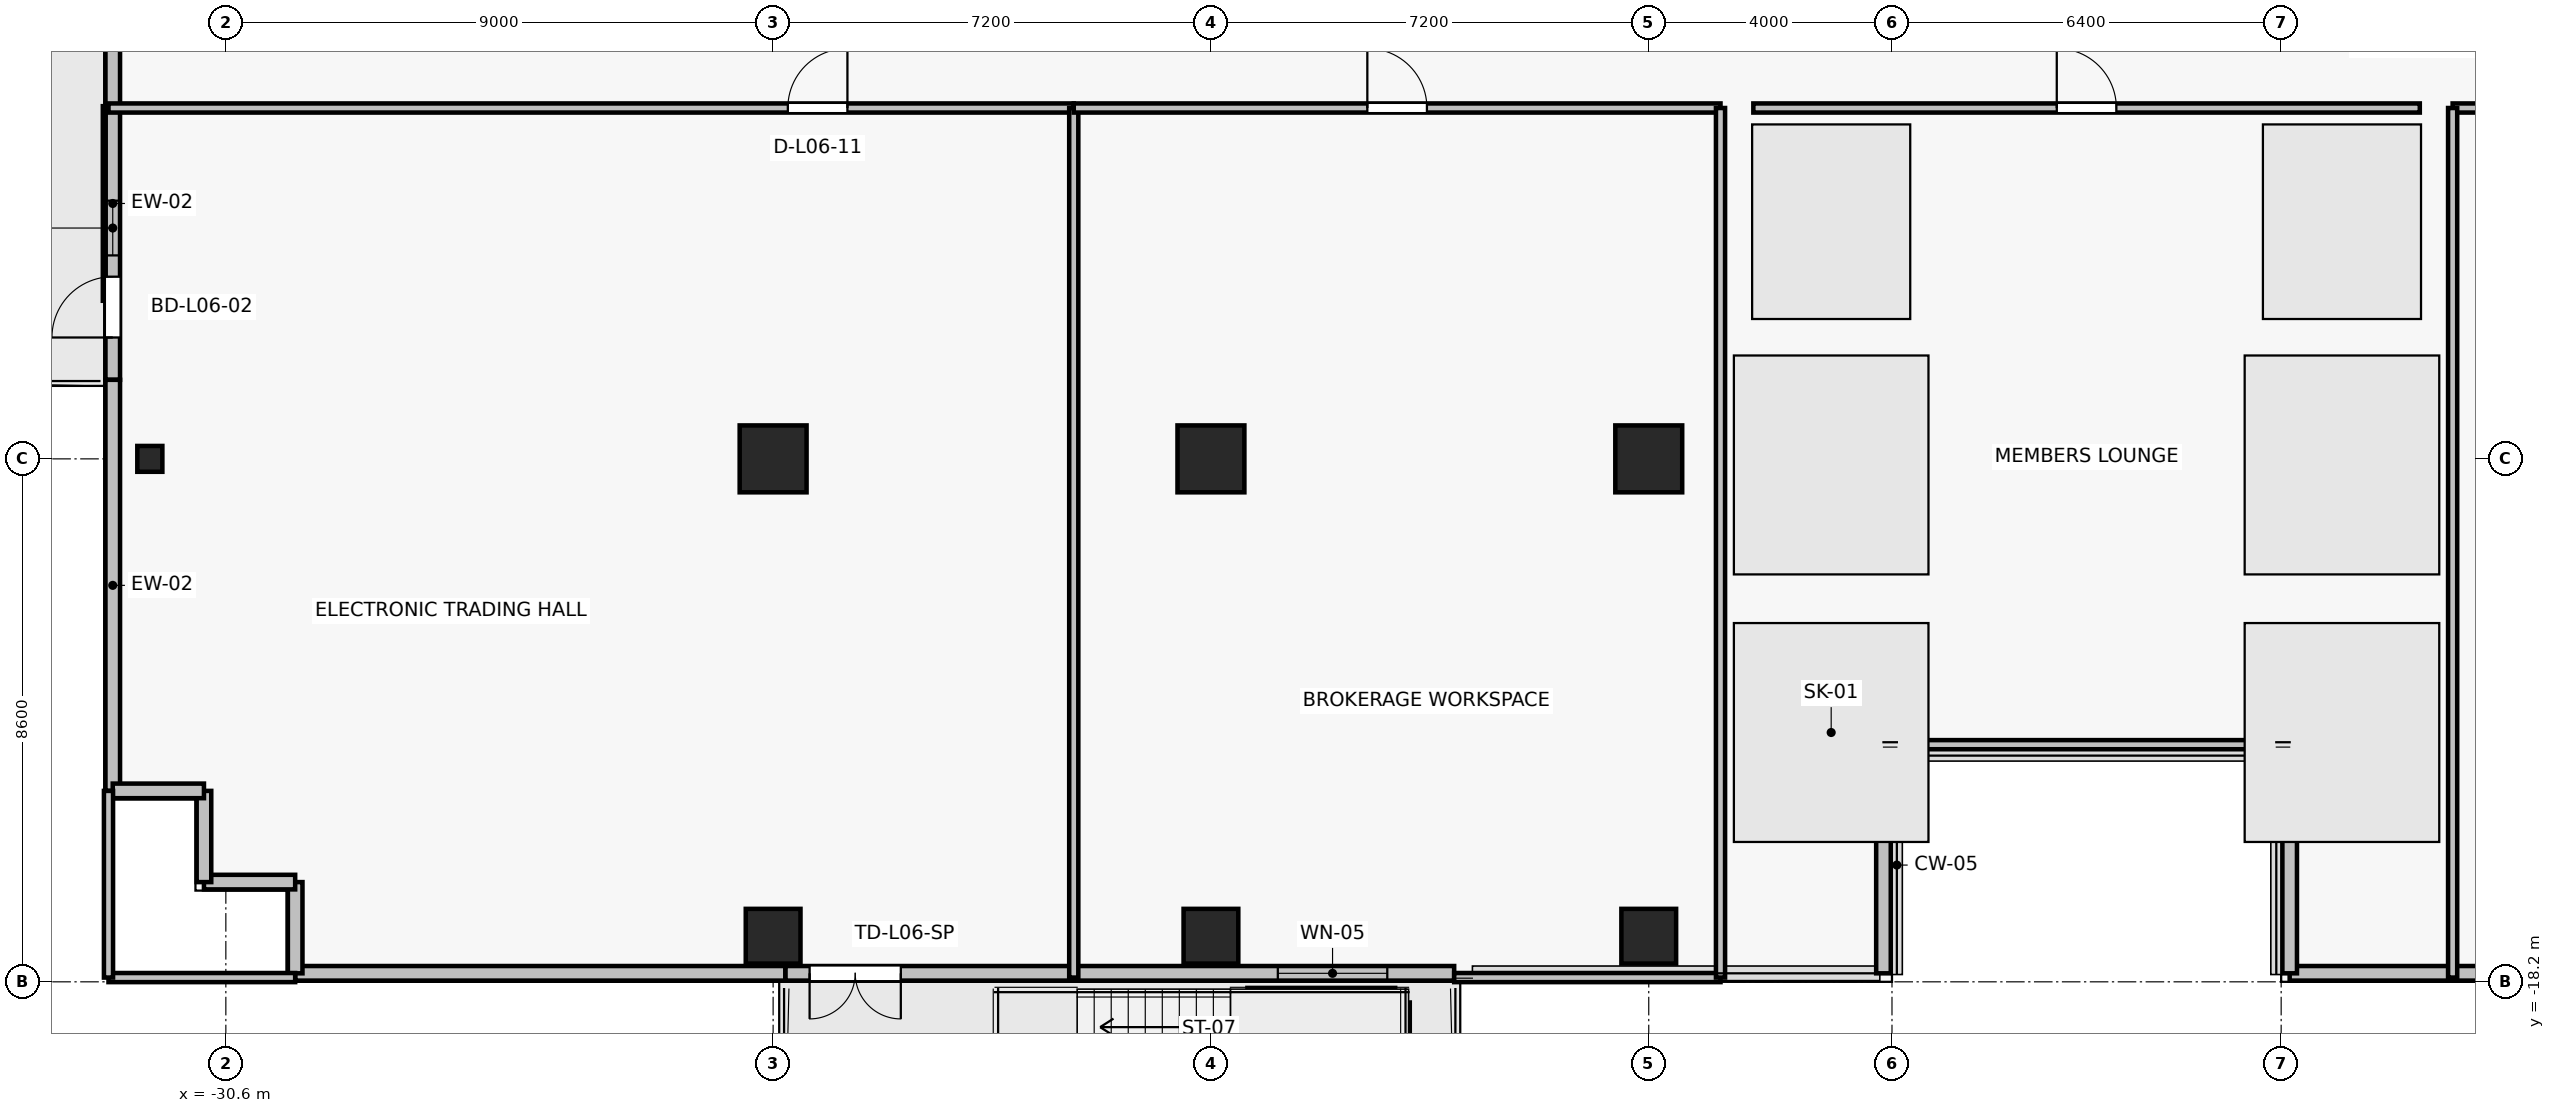
"""IFC4 building model, lengths in metres.
Left out: names, types, materials, properties, quantities, classifications, styles, units other than length and angle.
Written with IfcOpenShell. Run it as: python <this file> out.ifc"""

import sys

from ifc_helpers import new_model, si_unit, direction, frame, frame_2d, origin, origin_2d, place, context, subcontext, project, spatial, rectangle, i_section, extrude, source, transform, mapped, element, fill, save


model = new_model("IFC4")
c1 = context("Model", 3, precision=1e-05, world=origin(), true_north=direction((0.0, 1.0)))
c2 = subcontext(c1, "Body", "Model", "MODEL_VIEW")
j1 = project(units=[si_unit("LENGTHUNIT", "METRE"), si_unit("PLANEANGLEUNIT", "RADIAN")], contexts=[c1])
p1 = place(None, origin())
s1 = spatial("IfcSite", under=j1, at=p1, CompositionType="ELEMENT")
p2 = place(p1, origin())
s2 = spatial("IfcBuilding", under=s1, at=p2, CompositionType="ELEMENT")
p3 = place(p2, frame((0.0, 0.0, 27.4)))
s3 = spatial("IfcBuildingStorey", under=s2, at=p3, CompositionType="ELEMENT", Elevation=27.4)
for number, where, z_axis, x_axis in (
    (1, (-14.4, -9.6, 0.0), (0.0, 0.0, 1.0), (1.0, 0.0, 0.0)),
    (2, (-7.2, -9.6, 0.0), (0.0, 0.0, 1.0), (1.0, 0.0, 0.0)),
    (3, (-21.6, -9.6, 0.0), (0.0, 0.0, 1.0), (1.0, 0.0, 0.0)),
):
    element("IfcColumn", number, at=place(p3, frame(where, z_axis=z_axis, x_axis=x_axis)), inside=s3, PredefinedType="COLUMN", context=c2, shape_type="SweptSolid", body=[
        extrude(rectangle(XDim=1.1, YDim=1.1, at=origin_2d()), origin(), (0.0, 0.0, 1.0), 3.3),
    ])
for number, where, z_axis, x_axis in (
    (4, (-14.4, -17.45, 0.0), (0.0, 0.0, 1.0), (1.0, 0.0, 0.0)),
    (5, (-7.2, -17.45, 0.0), (0.0, 0.0, 1.0), (1.0, 0.0, 0.0)),
    (6, (-21.6, -17.45, 0.0), (0.0, 0.0, 1.0), (1.0, 0.0, 0.0)),
):
    element("IfcColumn", number, at=place(p3, frame(where, z_axis=z_axis, x_axis=x_axis)), inside=s3, PredefinedType="COLUMN", context=c2, shape_type="SweptSolid", body=[
        extrude(rectangle(XDim=0.9, YDim=0.9, at=origin_2d()), origin(), (0.0, 0.0, 1.0), 3.3),
    ])
p4 = place(p3, frame((-31.85, -9.6, 0.0), z_axis=(0.0, 0.0, 1.0), x_axis=(1.0, 0.0, 0.0)))
e7 = element("IfcColumn", 7, at=p4, inside=s3, PredefinedType="COLUMN", context=c2, shape_type="SweptSolid", body=[
    extrude(i_section(OverallWidth=0.412, OverallDepth=0.425, WebThickness=0.026, FlangeThickness=0.039, FilletRadius=0.015, at=origin_2d()), origin(), (0.0, 0.0, 1.0), 3.3),
])
p5 = place(p3, frame((-32.46, -8.3, 0.0), z_axis=(0.0, 0.0, 1.0), x_axis=(0.0, 1.0, 0.0)))
e8 = element("IfcWall", 8, at=p5, inside=s3, PredefinedType="SOLIDWALL", context=c2, shape_type="SweptSolid", body=[
    extrude(rectangle(XDim=5.8, YDim=0.24, at=frame_2d((2.9, 0.0))), origin(), (0.0, 0.0, 1.0), 3.075),
])
p6 = place(p5, frame((0.696, 0.0, 0.0)))
e9 = element("IfcOpeningElement", 9, at=p6, cuts=e8, PredefinedType="OPENING", context=c2, shape_type="SweptSolid", body=[
    extrude(rectangle(XDim=1.0, YDim=2.2, at=frame_2d((0.5, 1.1))), frame((0.0, 0.13, 0.0), z_axis=(0.0, -1.0, 0.0), x_axis=(1.0, 0.0, 0.0)), (0.0, 0.0, 1.0), 0.26),
])
p7 = place(p5, frame((2.046, 0.0, 0.85)))
e10 = element("IfcOpeningElement", 10, at=p7, cuts=e8, PredefinedType="OPENING", context=c2, shape_type="SweptSolid", body=[
    extrude(rectangle(XDim=0.9, YDim=1.35, at=frame_2d((0.45, 0.675))), frame((0.0, 0.13, 0.0), z_axis=(0.0, -1.0, 0.0), x_axis=(1.0, 0.0, 0.0)), (0.0, 0.0, 1.0), 0.26),
])
p8 = place(p3, frame((-10.4, -18.06, 0.0), z_axis=(0.0, 0.0, 1.0), x_axis=(-1.0, 0.0, 0.0)))
e11 = element("IfcWall", 11, at=p8, inside=s3, PredefinedType="SOLIDWALL", context=c2, shape_type="SweptSolid", body=[
    extrude(rectangle(XDim=11.0, YDim=0.24, at=frame_2d((5.5, 0.0))), origin(), (0.0, 0.0, 1.0), 2.59),
])
p9 = place(p8, frame((9.1, 0.0, 0.0)))
e12 = element("IfcOpeningElement", 12, at=p9, cuts=e11, PredefinedType="OPENING", context=c2, shape_type="SweptSolid", body=[
    extrude(rectangle(XDim=1.5, YDim=2.2, at=frame_2d((0.75, 1.1))), frame((0.0, 0.13, 0.0), z_axis=(0.0, -1.0, 0.0), x_axis=(1.0, 0.0, 0.0)), (0.0, 0.0, 1.0), 0.26),
])
p10 = place(p8, frame((1.1, 0.0, 0.85)))
e13 = element("IfcOpeningElement", 13, at=p10, cuts=e11, PredefinedType="OPENING", context=c2, shape_type="SweptSolid", body=[
    extrude(rectangle(XDim=1.8, YDim=1.6, at=frame_2d((0.9, 0.8))), frame((0.0, 0.13, 0.0), z_axis=(0.0, -1.0, 0.0), x_axis=(1.0, 0.0, 0.0)), (0.0, 0.0, 1.0), 0.26),
])
p11 = place(p3, frame((-32.46, -8.3, 0.0), z_axis=(0.0, 0.0, 1.0), x_axis=(0.0, -1.0, 0.0)))
e14 = element("IfcWall", 14, at=p11, inside=s3, PredefinedType="SOLIDWALL", context=c2, shape_type="SweptSolid", body=[
    extrude(rectangle(XDim=6.76, YDim=0.24, at=frame_2d((3.38, 0.0))), origin(), (0.0, 0.0, 1.0), 3.075),
])
p12 = place(p3, frame((3.34, -18.06, 0.0), z_axis=(0.0, 0.0, 1.0), x_axis=(1.0, 0.0, 0.0)))
e15 = element("IfcWall", 15, at=p12, inside=s3, PredefinedType="SOLIDWALL", context=c2, shape_type="SweptSolid", body=[
    extrude(rectangle(XDim=10.46, YDim=0.24, at=frame_2d((5.23, 0.0))), origin(), (0.0, 0.0, 1.0), 2.665),
])
for number, where, z_axis, x_axis in (
    (16, (3.34, -14.26, 0.0), (0.0, 0.0, 1.0), (0.0, -1.0, 0.0)),
    (17, (-3.34, -18.06, 0.0), (0.0, 0.0, 1.0), (0.0, 1.0, 0.0)),
):
    element("IfcWall", number, at=place(p3, frame(where, z_axis=z_axis, x_axis=x_axis)), inside=s3, PredefinedType="SOLIDWALL", context=c2, shape_type="SweptSolid", body=[
        extrude(rectangle(XDim=3.8, YDim=0.24, at=frame_2d((1.9, 0.0))), origin(), (0.0, 0.0, 1.0), 2.465),
    ])
p13 = place(p3, frame((-29.46, -18.06, 0.0), z_axis=(0.0, 0.0, 1.0), x_axis=(1.0, 0.0, 0.0)))
e18 = element("IfcWall", 18, at=p13, inside=s3, PredefinedType="SOLIDWALL", context=c2, shape_type="SweptSolid", body=[
    extrude(rectangle(XDim=8.06, YDim=0.24, at=frame_2d((4.03, 0.0))), origin(), (0.0, 0.0, 1.0), 3.075),
])
for number, where, z_axis, x_axis in (
    (19, (-29.46, -16.56, 0.0), (0.0, 0.0, 1.0), (0.0, -1.0, 0.0)),
    (20, (-30.96, -16.56, 0.0), (0.0, 0.0, 1.0), (1.0, 0.0, 0.0)),
    (21, (-30.96, -15.06, 0.0), (0.0, 0.0, 1.0), (0.0, -1.0, 0.0)),
    (22, (-32.46, -15.06, 0.0), (0.0, 0.0, 1.0), (1.0, 0.0, 0.0)),
):
    element("IfcWall", number, at=place(p3, frame(where, z_axis=z_axis, x_axis=x_axis)), inside=s3, PredefinedType="SOLIDWALL", context=c2, shape_type="SweptSolid", body=[
        extrude(rectangle(XDim=1.5, YDim=0.24, at=frame_2d((0.75, 0.0))), origin(), (0.0, 0.0, 1.0), 3.075),
    ])
p14 = place(p3, frame((-11.23, -20.72, -0.25), z_axis=(0.0, 0.0, 1.0), x_axis=(0.0, 1.0, 0.0)))
e23 = element("IfcWall", 23, at=p14, inside=s3, PredefinedType="SOLIDWALL", context=c2, shape_type="SweptSolid", body=[
    extrude(rectangle(XDim=2.18, YDim=0.2, at=frame_2d((1.09, 0.0))), origin(), (0.0, 0.0, 1.0), 1.7),
])
p15 = place(p3, frame((-13.8, -18.4, -0.25), z_axis=(0.0, 0.0, 1.0), x_axis=(1.0, 0.0, 0.0)))
e24 = element("IfcWall", 24, at=p15, inside=s3, PredefinedType="SOLIDWALL", context=c2, shape_type="SweptSolid", body=[
    extrude(rectangle(XDim=2.43, YDim=0.2, at=frame_2d((1.215, 0.0))), origin(), (0.0, 0.0, 1.0), 1.7),
])
p16 = place(p3, frame((-29.46, -18.13, 0.0), z_axis=(0.0, 0.0, 1.0), x_axis=(-1.0, 0.0, 0.0)))
e25 = element("IfcWall", 25, at=p16, inside=s3, PredefinedType="PARTITIONING", context=c2, shape_type="SweptSolid", body=[
    extrude(rectangle(XDim=3.07, YDim=0.15, at=frame_2d((1.535, 0.0))), origin(), (0.0, 0.0, 1.0), 2.59),
])
p17 = place(p3, frame((-32.53, -3.83, 0.0), z_axis=(0.0, 0.0, 1.0), x_axis=(1.0, 0.0, 0.0)))
e26 = element("IfcWall", 26, at=p17, inside=s3, PredefinedType="PARTITIONING", context=c2, shape_type="SweptSolid", body=[
    extrude(rectangle(XDim=15.874, YDim=0.15, at=frame_2d((7.937, 0.0))), origin(), (0.0, 0.0, 1.0), 2.465),
])
p18 = place(p17, frame((11.172, 0.0, 0.0)))
e27 = element("IfcOpeningElement", 27, at=p18, cuts=e26, PredefinedType="OPENING", context=c2, shape_type="SweptSolid", body=[
    extrude(rectangle(XDim=0.98, YDim=2.15, at=frame_2d((0.49, 1.075))), frame((0.0, 0.085, 0.0), z_axis=(0.0, -1.0, 0.0), x_axis=(1.0, 0.0, 0.0)), (0.0, 0.0, 1.0), 0.17),
])
p19 = place(p3, frame((-32.53, -18.13, 0.0), z_axis=(0.0, 0.0, 1.0), x_axis=(0.0, 1.0, 0.0)))
e28 = element("IfcWall", 28, at=p19, inside=s3, PredefinedType="PARTITIONING", context=c2, shape_type="SweptSolid", body=[
    extrude(rectangle(XDim=3.07, YDim=0.15, at=frame_2d((1.535, 0.0))), origin(), (0.0, 0.0, 1.0), 3.075),
])
p20 = place(p3, frame((-16.656, -3.83, 0.0), z_axis=(0.0, 0.0, 1.0), x_axis=(0.0, -1.0, 0.0)))
e29 = element("IfcWall", 29, at=p20, inside=s3, PredefinedType="PARTITIONING", context=c2, shape_type="SweptSolid", body=[
    extrude(rectangle(XDim=14.3, YDim=0.15, at=frame_2d((7.15, 0.0))), origin(), (0.0, 0.0, 1.0), 2.465),
])
p21 = place(p3, frame((-6.02, -18.13, 0.0), z_axis=(0.0, 0.0, 1.0), x_axis=(-1.0, 0.0, 0.0)))
e30 = element("IfcWall", 30, at=p21, inside=s3, PredefinedType="PARTITIONING", context=c2, shape_type="SweptSolid", body=[
    extrude(rectangle(XDim=4.38, YDim=0.15, at=frame_2d((2.19, 0.0))), origin(), (0.0, 0.0, 1.0), 2.59),
])
p22 = place(p3, frame((-16.656, -3.83, 0.0), z_axis=(0.0, 0.0, 1.0), x_axis=(1.0, 0.0, 0.0)))
e31 = element("IfcWall", 31, at=p22, inside=s3, PredefinedType="PARTITIONING", context=c2, shape_type="SweptSolid", body=[
    extrude(rectangle(XDim=10.636, YDim=0.15, at=frame_2d((5.318, 0.0))), origin(), (0.0, 0.0, 1.0), 2.465),
])
p23 = place(p22, frame((4.828, 0.0, 0.0)))
e32 = element("IfcOpeningElement", 32, at=p23, cuts=e31, PredefinedType="OPENING", context=c2, shape_type="SweptSolid", body=[
    extrude(rectangle(XDim=0.98, YDim=2.15, at=frame_2d((0.49, 1.075))), frame((0.0, 0.085, 0.0), z_axis=(0.0, -1.0, 0.0), x_axis=(1.0, 0.0, 0.0)), (0.0, 0.0, 1.0), 0.17),
])
p24 = place(p3, frame((-6.02, -3.83, 0.0), z_axis=(0.0, 0.0, 1.0), x_axis=(0.0, -1.0, 0.0)))
e33 = element("IfcWall", 33, at=p24, inside=s3, PredefinedType="PARTITIONING", context=c2, shape_type="SweptSolid", body=[
    extrude(rectangle(XDim=14.3, YDim=0.15, at=frame_2d((7.15, 0.0))), origin(), (0.0, 0.0, 1.0), 2.465),
])
p25 = place(p3, frame((6.02, -3.83, 0.0), z_axis=(0.0, 0.0, 1.0), x_axis=(1.0, 0.0, 0.0)))
e34 = element("IfcWall", 34, at=p25, inside=s3, PredefinedType="PARTITIONING", context=c2, shape_type="SweptSolid", body=[
    extrude(rectangle(XDim=22.51, YDim=0.15, at=frame_2d((11.255, 0.0))), origin(), (0.0, 0.0, 1.0), 2.465),
])
p26 = place(p25, frame((9.04, 0.0, 0.0)))
e35 = element("IfcOpeningElement", 35, at=p26, cuts=e34, PredefinedType="OPENING", context=c2, shape_type="SweptSolid", body=[
    extrude(rectangle(XDim=0.98, YDim=2.15, at=frame_2d((0.49, 1.075))), frame((0.0, 0.085, 0.0), z_axis=(0.0, -1.0, 0.0), x_axis=(1.0, 0.0, 0.0)), (0.0, 0.0, 1.0), 0.17),
])
p27 = place(p3, frame((6.02, -18.13, 0.0), z_axis=(0.0, 0.0, 1.0), x_axis=(0.0, 1.0, 0.0)))
e36 = element("IfcWall", 36, at=p27, inside=s3, PredefinedType="PARTITIONING", context=c2, shape_type="SweptSolid", body=[
    extrude(rectangle(XDim=14.3, YDim=0.15, at=frame_2d((7.15, 0.0))), origin(), (0.0, 0.0, 1.0), 2.465),
])
p28 = place(p3, frame((5.48, -14.3, 0.0), z_axis=(0.0, 0.0, 1.0), x_axis=(-1.0, 0.0, 0.0)))
e37 = element("IfcWall", 37, at=p28, inside=s3, PredefinedType="PARTITIONING", context=c2, shape_type="SweptSolid", body=[
    extrude(rectangle(XDim=10.96, YDim=0.15, at=frame_2d((5.48, 0.0))), origin(), (0.0, 0.0, 1.0), 2.465),
])
p29 = place(p3, frame((-5.48, -3.83, 0.0), z_axis=(0.0, 0.0, 1.0), x_axis=(1.0, 0.0, 0.0)))
e38 = element("IfcWall", 38, at=p29, inside=s3, PredefinedType="PARTITIONING", context=c2, shape_type="SweptSolid", body=[
    extrude(rectangle(XDim=10.96, YDim=0.15, at=frame_2d((5.48, 0.0))), origin(), (0.0, 0.0, 1.0), 3.075),
])
p30 = place(p29, frame((4.99, 0.0, 0.0)))
e39 = element("IfcOpeningElement", 39, at=p30, cuts=e38, PredefinedType="OPENING", context=c2, shape_type="SweptSolid", body=[
    extrude(rectangle(XDim=0.98, YDim=2.15, at=frame_2d((0.49, 1.075))), frame((0.0, 0.085, 0.0), z_axis=(0.0, -1.0, 0.0), x_axis=(1.0, 0.0, 0.0)), (0.0, 0.0, 1.0), 0.17),
])
p31 = place(p3, frame((0.0, 0.0, -0.25)))
p32 = place(p31, frame((-4.2, -14.1, 0.0)))
p33 = place(p32, frame((0.0, 0.0, 0.2)))
e40 = element("IfcWindow", 40, at=p33, inside=s3, PartitioningType="SINGLE_PANEL", PredefinedType="SKYLIGHT", context=c2, shape_type="SweptSolid", body=[
    extrude(rectangle(XDim=3.2, YDim=3.6, at=origin_2d()), origin(), (0.0, 0.0, 1.0), 0.05),
])
p34 = place(p31, frame((4.2, -14.1, 0.0)))
p35 = place(p34, frame((0.0, 0.0, 0.2)))
e41 = element("IfcWindow", 41, at=p35, inside=s3, PartitioningType="SINGLE_PANEL", PredefinedType="SKYLIGHT", context=c2, shape_type="SweptSolid", body=[
    extrude(rectangle(XDim=3.2, YDim=3.6, at=origin_2d()), origin(), (0.0, 0.0, 1.0), 0.05),
])
p36 = place(p31, frame((-4.2, -9.7, 0.0)))
p37 = place(p36, frame((0.0, 0.0, 0.2)))
e42 = element("IfcWindow", 42, at=p37, inside=s3, PartitioningType="SINGLE_PANEL", PredefinedType="SKYLIGHT", context=c2, shape_type="SweptSolid", body=[
    extrude(rectangle(XDim=3.2, YDim=3.6, at=origin_2d()), origin(), (0.0, 0.0, 1.0), 0.05),
])
p38 = place(p31, frame((4.2, -9.7, 0.0)))
p39 = place(p38, frame((0.0, 0.0, 0.2)))
e43 = element("IfcWindow", 43, at=p39, inside=s3, PartitioningType="SINGLE_PANEL", PredefinedType="SKYLIGHT", context=c2, shape_type="SweptSolid", body=[
    extrude(rectangle(XDim=3.2, YDim=3.6, at=origin_2d()), origin(), (0.0, 0.0, 1.0), 0.05),
])
p40 = place(p31, frame((-4.2, -5.7, 0.0)))
p41 = place(p40, frame((0.0, 0.0, 0.2)))
e44 = element("IfcWindow", 44, at=p41, inside=s3, PartitioningType="SINGLE_PANEL", PredefinedType="SKYLIGHT", context=c2, shape_type="SweptSolid", body=[
    extrude(rectangle(XDim=2.6, YDim=3.2, at=origin_2d()), origin(), (0.0, 0.0, 1.0), 0.05),
])
p42 = place(p31, frame((4.2, -5.7, 0.0)))
p43 = place(p42, frame((0.0, 0.0, 0.2)))
e45 = element("IfcWindow", 45, at=p43, inside=s3, PartitioningType="SINGLE_PANEL", PredefinedType="SKYLIGHT", context=c2, shape_type="SweptSolid", body=[
    extrude(rectangle(XDim=2.6, YDim=3.2, at=origin_2d()), origin(), (0.0, 0.0, 1.0), 0.05),
])
m1 = source(origin(), c2, "Body", "SweptSolid", [
    extrude(rectangle(XDim=1.0, YDim=2.2, at=frame_2d((0.5, 1.1))), frame((0.0, 0.025, 0.0), z_axis=(0.0, -1.0, 0.0), x_axis=(1.0, 0.0, 0.0)), (0.0, 0.0, 1.0), 0.05),
])
p44 = place(p6, origin())
e46 = element("IfcDoor", 46, at=p44, inside=s3, OperationType="SINGLE_SWING_LEFT", PredefinedType="DOOR", context=c2, shape_type="MappedRepresentation", body=[
    mapped(m1, transform((0.0, 0.0, 0.0), x_axis=(1.0, 0.0, 0.0), y_axis=(0.0, 1.0, 0.0), z_axis=(0.0, 0.0, 1.0), scale=1.0)),
])
fill(e9, e46)
m2 = source(origin(), c2, "Body", "SweptSolid", [
    extrude(rectangle(XDim=0.9, YDim=1.35, at=frame_2d((0.45, 0.675))), frame((0.0, 0.03, 0.0), z_axis=(0.0, -1.0, 0.0), x_axis=(1.0, 0.0, 0.0)), (0.0, 0.0, 1.0), 0.06),
])
p45 = place(p7, origin())
e47 = element("IfcWindow", 47, at=p45, inside=s3, PartitioningType="SINGLE_PANEL", PredefinedType="WINDOW", context=c2, shape_type="MappedRepresentation", body=[
    mapped(m2, transform((0.0, 0.0, 0.0), x_axis=(1.0, 0.0, 0.0), y_axis=(0.0, 1.0, 0.0), z_axis=(0.0, 0.0, 1.0), scale=1.0)),
])
fill(e10, e47)
m3 = source(origin(), c2, "Body", "SweptSolid", [
    extrude(rectangle(XDim=1.5, YDim=2.2, at=frame_2d((0.75, 1.1))), frame((0.0, 0.025, 0.0), z_axis=(0.0, -1.0, 0.0), x_axis=(1.0, 0.0, 0.0)), (0.0, 0.0, 1.0), 0.05),
])
p46 = place(p9, origin())
e48 = element("IfcDoor", 48, at=p46, inside=s3, OperationType="DOUBLE_DOOR_SINGLE_SWING", PredefinedType="DOOR", context=c2, shape_type="MappedRepresentation", body=[
    mapped(m3, transform((0.0, 0.0, 0.0), x_axis=(1.0, 0.0, 0.0), y_axis=(0.0, 1.0, 0.0), z_axis=(0.0, 0.0, 1.0), scale=1.0)),
])
fill(e12, e48)
m4 = source(origin(), c2, "Body", "SweptSolid", [
    extrude(rectangle(XDim=1.8, YDim=1.6, at=frame_2d((0.9, 0.8))), frame((0.0, 0.03, 0.0), z_axis=(0.0, -1.0, 0.0), x_axis=(1.0, 0.0, 0.0)), (0.0, 0.0, 1.0), 0.06),
])
p47 = place(p10, origin())
e49 = element("IfcWindow", 49, at=p47, inside=s3, PartitioningType="SINGLE_PANEL", PredefinedType="WINDOW", context=c2, shape_type="MappedRepresentation", body=[
    mapped(m4, transform((0.0, 0.0, 0.0), x_axis=(1.0, 0.0, 0.0), y_axis=(0.0, 1.0, 0.0), z_axis=(0.0, 0.0, 1.0), scale=1.0)),
])
fill(e13, e49)
m5 = source(origin(), c2, "Body", "SweptSolid", [
    extrude(rectangle(XDim=0.98, YDim=2.15, at=frame_2d((0.49, 1.075))), frame((0.0, 0.025, 0.0), z_axis=(0.0, -1.0, 0.0), x_axis=(1.0, 0.0, 0.0)), (0.0, 0.0, 1.0), 0.05),
])
p48 = place(p18, origin())
e50 = element("IfcDoor", 50, at=p48, inside=s3, OperationType="SINGLE_SWING_RIGHT", PredefinedType="DOOR", context=c2, shape_type="MappedRepresentation", body=[
    mapped(m5, transform((0.0, 0.0, 0.0), x_axis=(1.0, 0.0, 0.0), y_axis=(0.0, 1.0, 0.0), z_axis=(0.0, 0.0, 1.0), scale=1.0)),
])
fill(e27, e50)
p49 = place(p23, origin())
e51 = element("IfcDoor", 51, at=p49, inside=s3, OperationType="SINGLE_SWING_LEFT", PredefinedType="DOOR", context=c2, shape_type="MappedRepresentation", body=[
    mapped(m5, transform((0.0, 0.0, 0.0), x_axis=(1.0, 0.0, 0.0), y_axis=(0.0, 1.0, 0.0), z_axis=(0.0, 0.0, 1.0), scale=1.0)),
])
fill(e32, e51)
p50 = place(p30, origin())
e52 = element("IfcDoor", 52, at=p50, inside=s3, OperationType="SINGLE_SWING_LEFT", PredefinedType="DOOR", context=c2, shape_type="MappedRepresentation", body=[
    mapped(m5, transform((0.0, 0.0, 0.0), x_axis=(1.0, 0.0, 0.0), y_axis=(0.0, 1.0, 0.0), z_axis=(0.0, 0.0, 1.0), scale=1.0)),
])
fill(e39, e52)
save(model, sys.argv[1])
